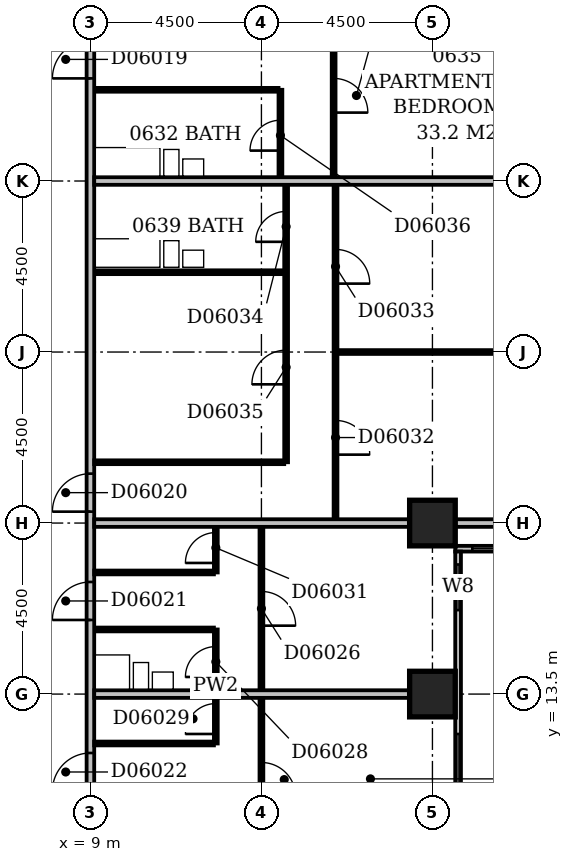
"""IFC4 building model, lengths in metres.
Left out: names, types, materials, properties, quantities, classifications, styles, units other than length and angle.
Written with IfcOpenShell. Run it as: python <this file> out.ifc"""

import sys

from ifc_helpers import new_model, si_unit, direction, frame, frame_2d, origin, origin_2d, place, context, subcontext, project, spatial, rectangle, extrude, element, fill, save


model = new_model("IFC4")
c1 = context("Model", 3, precision=1e-05, world=origin(), true_north=direction((0.0, 1.0)))
c2 = subcontext(c1, "Body", "Model", "MODEL_VIEW")
j1 = project(units=[si_unit("LENGTHUNIT", "METRE"), si_unit("PLANEANGLEUNIT", "RADIAN")], contexts=[c1])
p1 = place(None, origin())
s1 = spatial("IfcSite", under=j1, at=p1, CompositionType="ELEMENT")
p2 = place(p1, origin())
s2 = spatial("IfcBuilding", under=s1, at=p2, CompositionType="ELEMENT")
p3 = place(p2, frame((0.0, 0.0, 32.6)))
s3 = spatial("IfcBuildingStorey", under=s2, at=p3, CompositionType="ELEMENT", Elevation=32.6)
for number, where, z_axis, x_axis in (
    (1, (18.0, 13.5, -0.3), (0.0, 0.0, 1.0), (1.0, 0.0, 0.0)),
    (2, (18.0, 18.0, -0.3), (0.0, 0.0, 1.0), (1.0, 0.0, 0.0)),
):
    element("IfcColumn", number, at=place(p3, frame(where, z_axis=z_axis, x_axis=x_axis)), inside=s3, PredefinedType="COLUMN", context=c2, shape_type="SweptSolid", body=[
        extrude(rectangle(XDim=1.2, YDim=1.2, at=origin_2d()), origin(), (0.0, 0.0, 1.0), 3.6),
    ])
p4 = place(p3, frame((18.675, 8.4, 0.0), z_axis=(0.0, 0.0, 1.0), x_axis=(0.0, 1.0, 0.0)))
e3 = element("IfcWall", 3, at=p4, inside=s3, PredefinedType="STANDARD", context=c2, shape_type="SweptSolid", body=[
    extrude(rectangle(XDim=8.85, YDim=0.15, at=frame_2d((4.425, 0.0))), origin(), (0.0, 0.0, 1.0), 2.7),
])
p5 = place(p4, frame((1.65, 0.0, 0.6)))
e4 = element("IfcOpeningElement", 4, at=p5, cuts=e3, PredefinedType="OPENING", context=c2, shape_type="SweptSolid", body=[
    extrude(rectangle(XDim=2.4, YDim=1.8, at=frame_2d((1.2, 0.9))), frame((0.0, 0.087, 0.0), z_axis=(0.0, -1.0, 0.0), x_axis=(1.0, 0.0, 0.0)), (0.0, 0.0, 1.0), 0.174),
])
p6 = place(p4, frame((7.309, 0.0, 0.6)))
e5 = element("IfcOpeningElement", 5, at=p6, cuts=e3, PredefinedType="OPENING", context=c2, shape_type="SweptSolid", body=[
    extrude(rectangle(XDim=1.2, YDim=1.8, at=frame_2d((0.6, 0.9))), frame((0.0, 0.087, 0.0), z_axis=(0.0, -1.0, 0.0), x_axis=(1.0, 0.0, 0.0)), (0.0, 0.0, 1.0), 0.174),
])
p7 = place(p3, frame((18.6, 17.325, 0.0), z_axis=(0.0, 0.0, 1.0), x_axis=(1.0, 0.0, 0.0)))
e6 = element("IfcWall", 6, at=p7, inside=s3, PredefinedType="STANDARD", context=c2, shape_type="SweptSolid", body=[
    extrude(rectangle(XDim=4.65, YDim=0.15, at=frame_2d((2.325, 0.0))), origin(), (0.0, 0.0, 1.0), 2.7),
])
p8 = place(p7, frame((0.45, 0.0, 0.6)))
e7 = element("IfcOpeningElement", 7, at=p8, cuts=e6, PredefinedType="OPENING", context=c2, shape_type="SweptSolid", body=[
    extrude(rectangle(XDim=2.4, YDim=1.8, at=frame_2d((1.2, 0.9))), frame((0.0, 0.087, 0.0), z_axis=(0.0, -1.0, 0.0), x_axis=(1.0, 0.0, 0.0)), (0.0, 0.0, 1.0), 0.174),
])
p9 = place(p3, frame((9.0, 5.0, 0.0), z_axis=(0.0, 0.0, 1.0), x_axis=(0.0, 1.0, 0.0)))
e8 = element("IfcWall", 8, at=p9, inside=s3, PredefinedType="PARTITIONING", context=c2, shape_type="SweptSolid", body=[
    extrude(rectangle(XDim=44.5, YDim=0.2, at=frame_2d((22.25, 0.0))), origin(), (0.0, 0.0, 1.0), 3.3),
])
p10 = place(p9, frame((24.7, 0.0, 0.0)))
e9 = element("IfcOpeningElement", 9, at=p10, cuts=e8, PredefinedType="OPENING", context=c2, shape_type="SweptSolid", body=[
    extrude(rectangle(XDim=1.0, YDim=2.1, at=frame_2d((0.5, 1.05))), frame((0.0, 0.112, 0.0), z_axis=(0.0, -1.0, 0.0), x_axis=(1.0, 0.0, 0.0)), (0.0, 0.0, 1.0), 0.224),
])
p11 = place(p9, frame((13.3, 0.0, 0.0)))
e10 = element("IfcOpeningElement", 10, at=p11, cuts=e8, PredefinedType="OPENING", context=c2, shape_type="SweptSolid", body=[
    extrude(rectangle(XDim=1.0, YDim=2.1, at=frame_2d((0.5, 1.05))), frame((0.0, 0.112, 0.0), z_axis=(0.0, -1.0, 0.0), x_axis=(1.0, 0.0, 0.0)), (0.0, 0.0, 1.0), 0.224),
])
p12 = place(p9, frame((10.45, 0.0, 0.0)))
e11 = element("IfcOpeningElement", 11, at=p12, cuts=e8, PredefinedType="OPENING", context=c2, shape_type="SweptSolid", body=[
    extrude(rectangle(XDim=1.0, YDim=2.1, at=frame_2d((0.5, 1.05))), frame((0.0, 0.112, 0.0), z_axis=(0.0, -1.0, 0.0), x_axis=(1.0, 0.0, 0.0)), (0.0, 0.0, 1.0), 0.224),
])
p13 = place(p9, frame((5.95, 0.0, 0.0)))
e12 = element("IfcOpeningElement", 12, at=p13, cuts=e8, PredefinedType="OPENING", context=c2, shape_type="SweptSolid", body=[
    extrude(rectangle(XDim=1.0, YDim=2.1, at=frame_2d((0.5, 1.05))), frame((0.0, 0.112, 0.0), z_axis=(0.0, -1.0, 0.0), x_axis=(1.0, 0.0, 0.0)), (0.0, 0.0, 1.0), 0.224),
])
p14 = place(p9, frame((37.25, 0.0, 0.0)))
e13 = element("IfcOpeningElement", 13, at=p14, cuts=e8, PredefinedType="OPENING", context=c2, shape_type="SweptSolid", body=[
    extrude(rectangle(XDim=0.9, YDim=2.1, at=frame_2d((0.45, 1.05))), frame((0.0, 0.112, 0.0), z_axis=(0.0, -1.0, 0.0), x_axis=(1.0, 0.0, 0.0)), (0.0, 0.0, 1.0), 0.224),
])
p15 = place(p9, frame((1.5, 0.0, 0.0)))
e14 = element("IfcOpeningElement", 14, at=p15, cuts=e8, PredefinedType="OPENING", context=c2, shape_type="SweptSolid", body=[
    extrude(rectangle(XDim=0.9, YDim=2.1, at=frame_2d((0.45, 1.05))), frame((0.0, 0.112, 0.0), z_axis=(0.0, -1.0, 0.0), x_axis=(1.0, 0.0, 0.0)), (0.0, 0.0, 1.0), 0.224),
])
p16 = place(p3, frame((13.5, 9.6, 0.0), z_axis=(0.0, 0.0, 1.0), x_axis=(0.0, 1.0, 0.0)))
e15 = element("IfcWall", 15, at=p16, inside=s3, PredefinedType="PARTITIONING", context=c2, shape_type="SweptSolid", body=[
    extrude(rectangle(XDim=8.3, YDim=0.1, at=frame_2d((4.15, 0.0))), origin(), (0.0, 0.0, 1.0), 3.3),
])
p17 = place(p16, frame((5.7, 0.0, 0.0)))
e16 = element("IfcOpeningElement", 16, at=p17, cuts=e15, PredefinedType="OPENING", context=c2, shape_type="SweptSolid", body=[
    extrude(rectangle(XDim=0.9, YDim=2.1, at=frame_2d((0.45, 1.05))), frame((0.0, 0.062, 0.0), z_axis=(0.0, -1.0, 0.0), x_axis=(1.0, 0.0, 0.0)), (0.0, 0.0, 1.0), 0.124),
])
p18 = place(p16, frame((1.2, 0.0, 0.0)))
e17 = element("IfcOpeningElement", 17, at=p18, cuts=e15, PredefinedType="OPENING", context=c2, shape_type="SweptSolid", body=[
    extrude(rectangle(XDim=0.9, YDim=2.1, at=frame_2d((0.45, 1.05))), frame((0.0, 0.062, 0.0), z_axis=(0.0, -1.0, 0.0), x_axis=(1.0, 0.0, 0.0)), (0.0, 0.0, 1.0), 0.124),
])
p19 = place(p3, frame((9.1, 12.2, 0.0), z_axis=(0.0, 0.0, 1.0), x_axis=(1.0, 0.0, 0.0)))
e18 = element("IfcWall", 18, at=p19, inside=s3, PredefinedType="PARTITIONING", context=c2, shape_type="SweptSolid", body=[
    extrude(rectangle(XDim=3.15, YDim=0.1, at=frame_2d((1.575, 0.0))), origin(), (0.0, 0.0, 1.0), 3.3),
])
p20 = place(p3, frame((12.3, 12.2, 0.0), z_axis=(0.0, 0.0, 1.0), x_axis=(0.0, 1.0, 0.0)))
e19 = element("IfcWall", 19, at=p20, inside=s3, PredefinedType="PARTITIONING", context=c2, shape_type="SweptSolid", body=[
    extrude(rectangle(XDim=3.0, YDim=0.1, at=frame_2d((1.5, 0.0))), origin(), (0.0, 0.0, 1.0), 3.3),
])
p21 = place(p20, frame((1.75, 0.0, 0.0)))
e20 = element("IfcOpeningElement", 20, at=p21, cuts=e19, PredefinedType="OPENING", context=c2, shape_type="SweptSolid", body=[
    extrude(rectangle(XDim=0.8, YDim=2.1, at=frame_2d((0.4, 1.05))), frame((0.0, 0.062, 0.0), z_axis=(0.0, -1.0, 0.0), x_axis=(1.0, 0.0, 0.0)), (0.0, 0.0, 1.0), 0.124),
])
p22 = place(p20, frame((0.25, 0.0, 0.0)))
e21 = element("IfcOpeningElement", 21, at=p22, cuts=e19, PredefinedType="OPENING", context=c2, shape_type="SweptSolid", body=[
    extrude(rectangle(XDim=0.8, YDim=2.1, at=frame_2d((0.4, 1.05))), frame((0.0, 0.062, 0.0), z_axis=(0.0, -1.0, 0.0), x_axis=(1.0, 0.0, 0.0)), (0.0, 0.0, 1.0), 0.124),
])
p23 = place(p3, frame((9.1, 13.5, 0.0), z_axis=(0.0, 0.0, 1.0), x_axis=(1.0, 0.0, 0.0)))
e22 = element("IfcWall", 22, at=p23, inside=s3, PredefinedType="PARTITIONING", context=c2, shape_type="SweptSolid", body=[
    extrude(rectangle(XDim=8.3, YDim=0.2, at=frame_2d((4.15, 0.0))), origin(), (0.0, 0.0, 1.0), 3.3),
])
p24 = place(p3, frame((9.1, 15.2, 0.0), z_axis=(0.0, 0.0, 1.0), x_axis=(1.0, 0.0, 0.0)))
e23 = element("IfcWall", 23, at=p24, inside=s3, PredefinedType="PLUMBINGWALL", context=c2, shape_type="SweptSolid", body=[
    extrude(rectangle(XDim=3.15, YDim=0.1, at=frame_2d((1.575, 0.0))), origin(), (0.0, 0.0, 1.0), 3.3),
])
p25 = place(p3, frame((9.1, 16.7, 0.0), z_axis=(0.0, 0.0, 1.0), x_axis=(1.0, 0.0, 0.0)))
e24 = element("IfcWall", 24, at=p25, inside=s3, PredefinedType="PARTITIONING", context=c2, shape_type="SweptSolid", body=[
    extrude(rectangle(XDim=3.15, YDim=0.1, at=frame_2d((1.575, 0.0))), origin(), (0.0, 0.0, 1.0), 3.3),
])
p26 = place(p3, frame((12.3, 16.7, 0.0), z_axis=(0.0, 0.0, 1.0), x_axis=(0.0, 1.0, 0.0)))
e25 = element("IfcWall", 25, at=p26, inside=s3, PredefinedType="PARTITIONING", context=c2, shape_type="SweptSolid", body=[
    extrude(rectangle(XDim=1.2, YDim=0.1, at=frame_2d((0.6, 0.0))), origin(), (0.0, 0.0, 1.0), 3.3),
])
p27 = place(p26, frame((0.25, 0.0, 0.0)))
e26 = element("IfcOpeningElement", 26, at=p27, cuts=e25, PredefinedType="OPENING", context=c2, shape_type="SweptSolid", body=[
    extrude(rectangle(XDim=0.8, YDim=2.1, at=frame_2d((0.4, 1.05))), frame((0.0, 0.062, 0.0), z_axis=(0.0, -1.0, 0.0), x_axis=(1.0, 0.0, 0.0)), (0.0, 0.0, 1.0), 0.124),
])
p28 = place(p3, frame((9.1, 18.0, 0.0), z_axis=(0.0, 0.0, 1.0), x_axis=(1.0, 0.0, 0.0)))
e27 = element("IfcWall", 27, at=p28, inside=s3, PredefinedType="PARTITIONING", context=c2, shape_type="SweptSolid", body=[
    extrude(rectangle(XDim=8.3, YDim=0.2, at=frame_2d((4.15, 0.0))), origin(), (0.0, 0.0, 1.0), 2.6),
])
p29 = place(p3, frame((18.6, 18.0, 0.0), z_axis=(0.0, 0.0, 1.0), x_axis=(1.0, 0.0, 0.0)))
e28 = element("IfcWall", 28, at=p29, inside=s3, PredefinedType="PARTITIONING", context=c2, shape_type="SweptSolid", body=[
    extrude(rectangle(XDim=3.3, YDim=0.2, at=frame_2d((1.65, 0.0))), origin(), (0.0, 0.0, 1.0), 2.7),
])
p30 = place(p3, frame((15.45, 18.1, 0.0), z_axis=(0.0, 0.0, 1.0), x_axis=(0.0, 1.0, 0.0)))
e29 = element("IfcWall", 29, at=p30, inside=s3, PredefinedType="PARTITIONING", context=c2, shape_type="SweptSolid", body=[
    extrude(rectangle(XDim=8.8, YDim=0.1, at=frame_2d((4.4, 0.0))), origin(), (0.0, 0.0, 1.0), 3.3),
])
p31 = place(p30, frame((1.7, 0.0, 0.0)))
e30 = element("IfcOpeningElement", 30, at=p31, cuts=e29, PredefinedType="OPENING", context=c2, shape_type="SweptSolid", body=[
    extrude(rectangle(XDim=0.9, YDim=2.1, at=frame_2d((0.45, 1.05))), frame((0.0, 0.062, 0.0), z_axis=(0.0, -1.0, 0.0), x_axis=(1.0, 0.0, 0.0)), (0.0, 0.0, 1.0), 0.124),
])
p32 = place(p30, frame((6.2, 0.0, 0.0)))
e31 = element("IfcOpeningElement", 31, at=p32, cuts=e29, PredefinedType="OPENING", context=c2, shape_type="SweptSolid", body=[
    extrude(rectangle(XDim=0.9, YDim=2.1, at=frame_2d((0.45, 1.05))), frame((0.0, 0.062, 0.0), z_axis=(0.0, -1.0, 0.0), x_axis=(1.0, 0.0, 0.0)), (0.0, 0.0, 1.0), 0.124),
])
p33 = place(p3, frame((9.1, 19.6, 0.0), z_axis=(0.0, 0.0, 1.0), x_axis=(1.0, 0.0, 0.0)))
e32 = element("IfcWall", 32, at=p33, inside=s3, PredefinedType="PARTITIONING", context=c2, shape_type="SweptSolid", body=[
    extrude(rectangle(XDim=5.0, YDim=0.1, at=frame_2d((2.5, 0.0))), origin(), (0.0, 0.0, 1.0), 3.3),
])
p34 = place(p3, frame((14.15, 19.6, 0.0), z_axis=(0.0, 0.0, 1.0), x_axis=(0.0, 1.0, 0.0)))
e33 = element("IfcWall", 33, at=p34, inside=s3, PredefinedType="PARTITIONING", context=c2, shape_type="SweptSolid", body=[
    extrude(rectangle(XDim=7.3, YDim=0.1, at=frame_2d((3.65, 0.0))), origin(), (0.0, 0.0, 1.0), 3.3),
])
p35 = place(p34, frame((5.8, 0.0, 0.0)))
e34 = element("IfcOpeningElement", 34, at=p35, cuts=e33, PredefinedType="OPENING", context=c2, shape_type="SweptSolid", body=[
    extrude(rectangle(XDim=0.8, YDim=2.1, at=frame_2d((0.4, 1.05))), frame((0.0, 0.062, 0.0), z_axis=(0.0, -1.0, 0.0), x_axis=(1.0, 0.0, 0.0)), (0.0, 0.0, 1.0), 0.124),
])
p36 = place(p34, frame((2.05, 0.0, 0.0)))
e35 = element("IfcOpeningElement", 35, at=p36, cuts=e33, PredefinedType="OPENING", context=c2, shape_type="SweptSolid", body=[
    extrude(rectangle(XDim=0.9, YDim=2.1, at=frame_2d((0.45, 1.05))), frame((0.0, 0.062, 0.0), z_axis=(0.0, -1.0, 0.0), x_axis=(1.0, 0.0, 0.0)), (0.0, 0.0, 1.0), 0.124),
])
p37 = place(p3, frame((15.5, 22.5, 0.0), z_axis=(0.0, 0.0, 1.0), x_axis=(1.0, 0.0, 0.0)))
e36 = element("IfcWall", 36, at=p37, inside=s3, PredefinedType="PARTITIONING", context=c2, shape_type="SweptSolid", body=[
    extrude(rectangle(XDim=6.4, YDim=0.1, at=frame_2d((3.2, 0.0))), origin(), (0.0, 0.0, 1.0), 3.3),
])
p38 = place(p3, frame((9.1, 24.6, 0.0), z_axis=(0.0, 0.0, 1.0), x_axis=(1.0, 0.0, 0.0)))
e37 = element("IfcWall", 37, at=p38, inside=s3, PredefinedType="PLUMBINGWALL", context=c2, shape_type="SweptSolid", body=[
    extrude(rectangle(XDim=5.0, YDim=0.1, at=frame_2d((2.5, 0.0))), origin(), (0.0, 0.0, 1.0), 3.3),
])
p39 = place(p3, frame((9.1, 27.0, 0.0), z_axis=(0.0, 0.0, 1.0), x_axis=(1.0, 0.0, 0.0)))
e38 = element("IfcWall", 38, at=p39, inside=s3, PredefinedType="PARTITIONING", context=c2, shape_type="SweptSolid", body=[
    extrude(rectangle(XDim=12.8, YDim=0.2, at=frame_2d((6.4, 0.0))), origin(), (0.0, 0.0, 1.0), 2.7),
])
p40 = place(p3, frame((14.0, 27.1, 0.0), z_axis=(0.0, 0.0, 1.0), x_axis=(0.0, 1.0, 0.0)))
e39 = element("IfcWall", 39, at=p40, inside=s3, PredefinedType="PARTITIONING", context=c2, shape_type="SweptSolid", body=[
    extrude(rectangle(XDim=2.3, YDim=0.1, at=frame_2d((1.15, 0.0))), origin(), (0.0, 0.0, 1.0), 3.3),
])
p41 = place(p40, frame((0.7, 0.0, 0.0)))
e40 = element("IfcOpeningElement", 40, at=p41, cuts=e39, PredefinedType="OPENING", context=c2, shape_type="SweptSolid", body=[
    extrude(rectangle(XDim=0.8, YDim=2.1, at=frame_2d((0.4, 1.05))), frame((0.0, 0.062, 0.0), z_axis=(0.0, -1.0, 0.0), x_axis=(1.0, 0.0, 0.0)), (0.0, 0.0, 1.0), 0.124),
])
p42 = place(p3, frame((15.4, 27.1, 0.0), z_axis=(0.0, 0.0, 1.0), x_axis=(0.0, 1.0, 0.0)))
e41 = element("IfcWall", 41, at=p42, inside=s3, PredefinedType="PARTITIONING", context=c2, shape_type="SweptSolid", body=[
    extrude(rectangle(XDim=8.8, YDim=0.1, at=frame_2d((4.4, 0.0))), origin(), (0.0, 0.0, 1.0), 3.3),
])
p43 = place(p42, frame((1.7, 0.0, 0.0)))
e42 = element("IfcOpeningElement", 42, at=p43, cuts=e41, PredefinedType="OPENING", context=c2, shape_type="SweptSolid", body=[
    extrude(rectangle(XDim=0.9, YDim=2.1, at=frame_2d((0.45, 1.05))), frame((0.0, 0.062, 0.0), z_axis=(0.0, -1.0, 0.0), x_axis=(1.0, 0.0, 0.0)), (0.0, 0.0, 1.0), 0.124),
])
p44 = place(p42, frame((6.2, 0.0, 0.0)))
e43 = element("IfcOpeningElement", 43, at=p44, cuts=e41, PredefinedType="OPENING", context=c2, shape_type="SweptSolid", body=[
    extrude(rectangle(XDim=0.9, YDim=2.1, at=frame_2d((0.45, 1.05))), frame((0.0, 0.062, 0.0), z_axis=(0.0, -1.0, 0.0), x_axis=(1.0, 0.0, 0.0)), (0.0, 0.0, 1.0), 0.124),
])
p45 = place(p3, frame((9.1, 29.4, 0.0), z_axis=(0.0, 0.0, 1.0), x_axis=(1.0, 0.0, 0.0)))
e44 = element("IfcWall", 44, at=p45, inside=s3, PredefinedType="PLUMBINGWALL", context=c2, shape_type="SweptSolid", body=[
    extrude(rectangle(XDim=4.85, YDim=0.1, at=frame_2d((2.425, 0.0))), origin(), (0.0, 0.0, 1.0), 3.3),
])
p46 = place(p5, origin())
e45 = element("IfcWindow", 45, at=p46, inside=s3, PartitioningType="SINGLE_PANEL", PredefinedType="WINDOW", context=c2, shape_type="SweptSolid", body=[
    extrude(rectangle(XDim=2.4, YDim=1.8, at=frame_2d((1.2, 0.9))), frame((0.0, 0.03, 0.0), z_axis=(0.0, -1.0, 0.0), x_axis=(1.0, 0.0, 0.0)), (0.0, 0.0, 1.0), 0.06),
])
fill(e4, e45)
p47 = place(p6, origin())
e46 = element("IfcWindow", 46, at=p47, inside=s3, PartitioningType="SINGLE_PANEL", PredefinedType="WINDOW", context=c2, shape_type="SweptSolid", body=[
    extrude(rectangle(XDim=1.2, YDim=1.8, at=frame_2d((0.6, 0.9))), frame((0.0, 0.03, 0.0), z_axis=(0.0, -1.0, 0.0), x_axis=(1.0, 0.0, 0.0)), (0.0, 0.0, 1.0), 0.06),
])
fill(e5, e46)
p48 = place(p8, origin())
e47 = element("IfcWindow", 47, at=p48, inside=s3, PartitioningType="SINGLE_PANEL", PredefinedType="WINDOW", context=c2, shape_type="SweptSolid", body=[
    extrude(rectangle(XDim=2.4, YDim=1.8, at=frame_2d((1.2, 0.9))), frame((0.0, 0.03, 0.0), z_axis=(0.0, -1.0, 0.0), x_axis=(1.0, 0.0, 0.0)), (0.0, 0.0, 1.0), 0.06),
])
fill(e7, e47)
p49 = place(p10, origin())
e48 = element("IfcDoor", 48, at=p49, inside=s3, OperationType="SINGLE_SWING_LEFT", PredefinedType="DOOR", context=c2, shape_type="SweptSolid", body=[
    extrude(rectangle(XDim=1.0, YDim=2.1, at=frame_2d((0.5, 1.05))), frame((0.0, 0.025, 0.0), z_axis=(0.0, -1.0, 0.0), x_axis=(1.0, 0.0, 0.0)), (0.0, 0.0, 1.0), 0.05),
])
fill(e9, e48)
p50 = place(p11, origin())
e49 = element("IfcDoor", 49, at=p50, inside=s3, OperationType="SINGLE_SWING_LEFT", PredefinedType="DOOR", context=c2, shape_type="SweptSolid", body=[
    extrude(rectangle(XDim=1.0, YDim=2.1, at=frame_2d((0.5, 1.05))), frame((0.0, 0.025, 0.0), z_axis=(0.0, -1.0, 0.0), x_axis=(1.0, 0.0, 0.0)), (0.0, 0.0, 1.0), 0.05),
])
fill(e10, e49)
p51 = place(p12, origin())
e50 = element("IfcDoor", 50, at=p51, inside=s3, OperationType="SINGLE_SWING_LEFT", PredefinedType="DOOR", context=c2, shape_type="SweptSolid", body=[
    extrude(rectangle(XDim=1.0, YDim=2.1, at=frame_2d((0.5, 1.05))), frame((0.0, 0.025, 0.0), z_axis=(0.0, -1.0, 0.0), x_axis=(1.0, 0.0, 0.0)), (0.0, 0.0, 1.0), 0.05),
])
fill(e11, e50)
p52 = place(p13, origin())
e51 = element("IfcDoor", 51, at=p52, inside=s3, OperationType="SINGLE_SWING_LEFT", PredefinedType="DOOR", context=c2, shape_type="SweptSolid", body=[
    extrude(rectangle(XDim=1.0, YDim=2.1, at=frame_2d((0.5, 1.05))), frame((0.0, 0.025, 0.0), z_axis=(0.0, -1.0, 0.0), x_axis=(1.0, 0.0, 0.0)), (0.0, 0.0, 1.0), 0.05),
])
fill(e12, e51)
p53 = place(p17, frame((0.9, 0.0, 0.0), z_axis=(0.0, 0.0, 1.0), x_axis=(-1.0, 0.0, 0.0)))
e52 = element("IfcDoor", 52, at=p53, inside=s3, OperationType="SINGLE_SWING_RIGHT", PredefinedType="DOOR", context=c2, shape_type="SweptSolid", body=[
    extrude(rectangle(XDim=0.9, YDim=2.1, at=frame_2d((0.45, 1.05))), frame((0.0, 0.025, 0.0), z_axis=(0.0, -1.0, 0.0), x_axis=(1.0, 0.0, 0.0)), (0.0, 0.0, 1.0), 0.05),
])
fill(e16, e52)
p54 = place(p18, frame((0.9, 0.0, 0.0), z_axis=(0.0, 0.0, 1.0), x_axis=(-1.0, 0.0, 0.0)))
e53 = element("IfcDoor", 53, at=p54, inside=s3, OperationType="SINGLE_SWING_RIGHT", PredefinedType="DOOR", context=c2, shape_type="SweptSolid", body=[
    extrude(rectangle(XDim=0.9, YDim=2.1, at=frame_2d((0.45, 1.05))), frame((0.0, 0.025, 0.0), z_axis=(0.0, -1.0, 0.0), x_axis=(1.0, 0.0, 0.0)), (0.0, 0.0, 1.0), 0.05),
])
fill(e17, e53)
p55 = place(p21, origin())
e54 = element("IfcDoor", 54, at=p55, inside=s3, OperationType="SINGLE_SWING_LEFT", PredefinedType="DOOR", context=c2, shape_type="SweptSolid", body=[
    extrude(rectangle(XDim=0.8, YDim=2.1, at=frame_2d((0.4, 1.05))), frame((0.0, 0.025, 0.0), z_axis=(0.0, -1.0, 0.0), x_axis=(1.0, 0.0, 0.0)), (0.0, 0.0, 1.0), 0.05),
])
fill(e20, e54)
p56 = place(p22, origin())
e55 = element("IfcDoor", 55, at=p56, inside=s3, OperationType="SINGLE_SWING_LEFT", PredefinedType="DOOR", context=c2, shape_type="SweptSolid", body=[
    extrude(rectangle(XDim=0.8, YDim=2.1, at=frame_2d((0.4, 1.05))), frame((0.0, 0.025, 0.0), z_axis=(0.0, -1.0, 0.0), x_axis=(1.0, 0.0, 0.0)), (0.0, 0.0, 1.0), 0.05),
])
fill(e21, e55)
p57 = place(p27, origin())
e56 = element("IfcDoor", 56, at=p57, inside=s3, OperationType="SINGLE_SWING_LEFT", PredefinedType="DOOR", context=c2, shape_type="SweptSolid", body=[
    extrude(rectangle(XDim=0.8, YDim=2.1, at=frame_2d((0.4, 1.05))), frame((0.0, 0.025, 0.0), z_axis=(0.0, -1.0, 0.0), x_axis=(1.0, 0.0, 0.0)), (0.0, 0.0, 1.0), 0.05),
])
fill(e26, e56)
p58 = place(p31, frame((0.9, 0.0, 0.0), z_axis=(0.0, 0.0, 1.0), x_axis=(-1.0, 0.0, 0.0)))
e57 = element("IfcDoor", 57, at=p58, inside=s3, OperationType="SINGLE_SWING_RIGHT", PredefinedType="DOOR", context=c2, shape_type="SweptSolid", body=[
    extrude(rectangle(XDim=0.9, YDim=2.1, at=frame_2d((0.45, 1.05))), frame((0.0, 0.025, 0.0), z_axis=(0.0, -1.0, 0.0), x_axis=(1.0, 0.0, 0.0)), (0.0, 0.0, 1.0), 0.05),
])
fill(e30, e57)
p59 = place(p32, frame((0.9, 0.0, 0.0), z_axis=(0.0, 0.0, 1.0), x_axis=(-1.0, 0.0, 0.0)))
e58 = element("IfcDoor", 58, at=p59, inside=s3, OperationType="SINGLE_SWING_RIGHT", PredefinedType="DOOR", context=c2, shape_type="SweptSolid", body=[
    extrude(rectangle(XDim=0.9, YDim=2.1, at=frame_2d((0.45, 1.05))), frame((0.0, 0.025, 0.0), z_axis=(0.0, -1.0, 0.0), x_axis=(1.0, 0.0, 0.0)), (0.0, 0.0, 1.0), 0.05),
])
fill(e31, e58)
p60 = place(p35, origin())
e59 = element("IfcDoor", 59, at=p60, inside=s3, OperationType="SINGLE_SWING_LEFT", PredefinedType="DOOR", context=c2, shape_type="SweptSolid", body=[
    extrude(rectangle(XDim=0.8, YDim=2.1, at=frame_2d((0.4, 1.05))), frame((0.0, 0.025, 0.0), z_axis=(0.0, -1.0, 0.0), x_axis=(1.0, 0.0, 0.0)), (0.0, 0.0, 1.0), 0.05),
])
fill(e34, e59)
p61 = place(p36, origin())
e60 = element("IfcDoor", 60, at=p61, inside=s3, OperationType="SINGLE_SWING_LEFT", PredefinedType="DOOR", context=c2, shape_type="SweptSolid", body=[
    extrude(rectangle(XDim=0.9, YDim=2.1, at=frame_2d((0.45, 1.05))), frame((0.0, 0.025, 0.0), z_axis=(0.0, -1.0, 0.0), x_axis=(1.0, 0.0, 0.0)), (0.0, 0.0, 1.0), 0.05),
])
fill(e35, e60)
p62 = place(p41, origin())
e61 = element("IfcDoor", 61, at=p62, inside=s3, OperationType="SINGLE_SWING_LEFT", PredefinedType="DOOR", context=c2, shape_type="SweptSolid", body=[
    extrude(rectangle(XDim=0.8, YDim=2.1, at=frame_2d((0.4, 1.05))), frame((0.0, 0.025, 0.0), z_axis=(0.0, -1.0, 0.0), x_axis=(1.0, 0.0, 0.0)), (0.0, 0.0, 1.0), 0.05),
])
fill(e40, e61)
p63 = place(p43, frame((0.9, 0.0, 0.0), z_axis=(0.0, 0.0, 1.0), x_axis=(-1.0, 0.0, 0.0)))
e62 = element("IfcDoor", 62, at=p63, inside=s3, OperationType="SINGLE_SWING_RIGHT", PredefinedType="DOOR", context=c2, shape_type="SweptSolid", body=[
    extrude(rectangle(XDim=0.9, YDim=2.1, at=frame_2d((0.45, 1.05))), frame((0.0, 0.025, 0.0), z_axis=(0.0, -1.0, 0.0), x_axis=(1.0, 0.0, 0.0)), (0.0, 0.0, 1.0), 0.05),
])
fill(e42, e62)
save(model, sys.argv[1])
